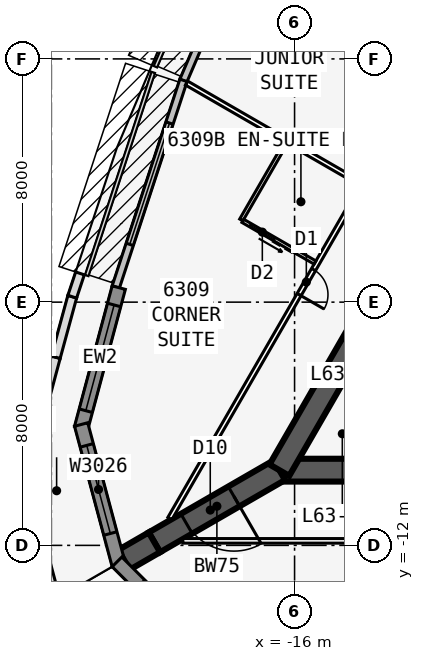
"""IFC4 building model, lengths in metres.
Left out: names, types, materials, properties, quantities, classifications, styles, units other than length and angle.
Written with IfcOpenShell. Run it as: python <this file> out.ifc"""

import sys

from ifc_helpers import new_model, si_unit, direction, frame, frame_2d, origin, place, context, subcontext, project, spatial, polyline, rectangle, outline, extrude, element, fill, save


model = new_model("IFC4")
c1 = context("Model", 3, precision=1e-05, world=origin(), true_north=direction((0.0, 1.0)))
c2 = subcontext(c1, "Body", "Model", "MODEL_VIEW")
j1 = project(units=[si_unit("LENGTHUNIT", "METRE"), si_unit("PLANEANGLEUNIT", "RADIAN")], contexts=[c1])
p1 = place(None, origin())
s1 = spatial("IfcSite", under=j1, at=p1, CompositionType="ELEMENT")
p2 = place(p1, origin())
s2 = spatial("IfcBuilding", under=s1, at=p2, CompositionType="ELEMENT")
p3 = place(p2, frame((0.0, 0.0, 239.3)))
s3 = spatial("IfcBuildingStorey", under=s2, at=p3, CompositionType="ELEMENT", Elevation=239.3)
p4 = place(p3, frame((-16.5, -9.526, 0.0), z_axis=(0.0, 0.0, 1.0), x_axis=(1.0, 0.0, 0.0)))
e1 = element("IfcWall", 1, at=p4, inside=s3, PredefinedType="SHEAR", context=c2, shape_type="SweptSolid", body=[
    extrude(rectangle(XDim=33.0, YDim=0.75, at=frame_2d((16.5, 0.0))), origin(), (0.0, 0.0, 1.0), 3.6),
])
p5 = place(p4, frame((14.05, 0.0, 0.0)))
e2 = element("IfcOpeningElement", 2, at=p5, cuts=e1, PredefinedType="OPENING", context=c2, shape_type="SweptSolid", body=[
    extrude(rectangle(XDim=1.8, YDim=2.13, at=frame_2d((0.9, 1.065))), frame((0.0, 0.385, 0.0), z_axis=(0.0, -1.0, 0.0), x_axis=(1.0, 0.0, 0.0)), (0.0, 0.0, 1.0), 0.77),
])
p6 = place(p3, frame((0.0, 19.052, 0.0), z_axis=(0.0, 0.0, 1.0), x_axis=(-0.499999749417, -0.866025548458, 0.0)))
e3 = element("IfcWall", 3, at=p6, inside=s3, PredefinedType="SHEAR", context=c2, shape_type="SweptSolid", body=[
    extrude(rectangle(XDim=33.0, YDim=0.75, at=frame_2d((16.5, 0.0))), origin(), (0.0, 0.0, 1.0), 3.6),
])
p7 = place(p6, frame((14.15, 0.0, 0.0)))
e4 = element("IfcOpeningElement", 4, at=p7, cuts=e3, PredefinedType="OPENING", context=c2, shape_type="SweptSolid", body=[
    extrude(rectangle(XDim=1.8, YDim=2.13, at=frame_2d((0.9, 1.065))), frame((0.0, 0.385, 0.0), z_axis=(0.0, -1.0, 0.0), x_axis=(1.0, 0.0, 0.0)), (0.0, 0.0, 1.0), 0.77),
])
p8 = place(p6, frame((12.6, 0.0, 0.0)))
e5 = element("IfcOpeningElement", 5, at=p8, cuts=e3, PredefinedType="OPENING", context=c2, shape_type="SweptSolid", body=[
    extrude(rectangle(XDim=1.0, YDim=2.13, at=frame_2d((0.5, 1.065))), frame((0.0, 0.385, 0.0), z_axis=(0.0, -1.0, 0.0), x_axis=(1.0, 0.0, 0.0)), (0.0, 0.0, 1.0), 0.77),
])
p9 = place(p3, frame((-16.5, -9.526, 0.0), z_axis=(0.0, 0.0, 1.0), x_axis=(-0.866031398331, -0.499989616998, 0.0)))
e6 = element("IfcWall", 6, at=p9, inside=s3, PredefinedType="SHEAR", context=c2, shape_type="SweptSolid", body=[
    extrude(rectangle(XDim=4.746, YDim=0.75, at=frame_2d((2.373, 0.0))), origin(), (0.0, 0.0, 1.0), 3.6),
])
p10 = place(p9, frame((1.725, 0.0, 0.0)))
e7 = element("IfcOpeningElement", 7, at=p10, cuts=e6, PredefinedType="OPENING", context=c2, shape_type="SweptSolid", body=[
    extrude(rectangle(XDim=1.8, YDim=2.13, at=frame_2d((0.9, 1.065))), frame((0.0, 0.385, 0.0), z_axis=(0.0, -1.0, 0.0), x_axis=(1.0, 0.0, 0.0)), (0.0, 0.0, 1.0), 0.77),
])
p11 = place(p3, frame((-20.61, -11.899, 0.0), z_axis=(0.0, 0.0, 1.0), x_axis=(-0.866009537788, -0.500027479704, 0.0)))
e8 = element("IfcWall", 8, at=p11, inside=s3, PredefinedType="SHEAR", context=c2, shape_type="SweptSolid", body=[
    extrude(rectangle(XDim=1.155, YDim=0.75, at=frame_2d((0.577, 0.0))), origin(), (0.0, 0.0, 1.0), 3.6),
])
p12 = place(p3, frame((-18.866, 5.136, 0.0), z_axis=(0.0, 0.0, 1.0), x_axis=(-0.393290226175, -0.91941437774, 0.0)))
e9 = element("IfcWall", 9, at=p12, inside=s3, PredefinedType="STANDARD", context=c2, shape_type="SweptSolid", body=[
    extrude(rectangle(XDim=2.014, YDim=0.25, at=frame_2d((1.007, 0.0))), origin(), (0.0, 0.0, 1.0), 3.435),
])
p13 = place(p3, frame((-19.654, 3.294, 0.0), z_axis=(0.0, 0.0, 1.0), x_axis=(-0.311328857048, -0.95030223759, 0.0)))
e10 = element("IfcWall", 10, at=p13, inside=s3, PredefinedType="STANDARD", context=c2, shape_type="SweptSolid", body=[
    extrude(rectangle(XDim=7.153, YDim=0.25, at=frame_2d((3.576, 0.0))), origin(), (0.0, 0.0, 1.0), 3.435),
])
p14 = place(p13, frame((1.476, 0.0, 0.45)))
e11 = element("IfcOpeningElement", 11, at=p14, cuts=e10, PredefinedType="OPENING", context=c2, shape_type="SweptSolid", body=[
    extrude(rectangle(XDim=4.2, YDim=2.6, at=frame_2d((2.1, 1.3))), frame((0.0, 0.135, 0.0), z_axis=(0.0, -1.0, 0.0), x_axis=(1.0, 0.0, 0.0)), (0.0, 0.0, 1.0), 0.27),
])
p15 = place(p3, frame((-21.783, -3.522, 0.0), z_axis=(0.0, 0.0, 1.0), x_axis=(-0.25880328844, -0.965930048136, 0.0)))
e12 = element("IfcWall", 12, at=p15, inside=s3, PredefinedType="SOLIDWALL", context=c2, shape_type="SweptSolid", body=[
    extrude(rectangle(XDim=4.782, YDim=0.45, at=frame_2d((2.391, 0.0))), origin(), (0.0, 0.0, 1.0), 3.435),
])
p16 = place(p15, frame((0.591, 0.0, 0.45)))
e13 = element("IfcOpeningElement", 13, at=p16, cuts=e12, PredefinedType="OPENING", context=c2, shape_type="SweptSolid", body=[
    extrude(rectangle(XDim=3.6, YDim=2.6, at=frame_2d((1.8, 1.3))), frame((0.0, 0.235, 0.0), z_axis=(0.0, -1.0, 0.0), x_axis=(1.0, 0.0, 0.0)), (0.0, 0.0, 1.0), 0.47),
])
p17 = place(p3, frame((-23.02, -8.025, 0.0), z_axis=(0.0, 0.0, 1.0), x_axis=(0.25880328844, -0.965930048136, 0.0)))
e14 = element("IfcWall", 14, at=p17, inside=s3, PredefinedType="SOLIDWALL", context=c2, shape_type="SweptSolid", body=[
    extrude(outline(polyline([(4.782, 0.225), (4.722, 0.225), (4.303, 0.113), (4.273, 0.225), (0.0, 0.225), (0.0, -0.225), (4.782, -0.225), (4.782, 0.225)])), origin(), (0.0, 0.0, 1.0), 3.435),
])
p18 = place(p17, frame((0.711, 0.0, 0.45)))
e15 = element("IfcOpeningElement", 15, at=p18, cuts=e14, PredefinedType="OPENING", context=c2, shape_type="SweptSolid", body=[
    extrude(rectangle(XDim=3.0, YDim=2.6, at=frame_2d((1.5, 1.3))), frame((0.0, 0.235, 0.0), z_axis=(0.0, -1.0, 0.0), x_axis=(1.0, 0.0, 0.0)), (0.0, 0.0, 1.0), 0.47),
])
p19 = place(p3, frame((-21.841, -12.542, 0.0), z_axis=(0.0, 0.0, 1.0), x_axis=(0.707081252484, -0.707132308968, 0.0)))
e16 = element("IfcWall", 16, at=p19, inside=s3, PredefinedType="SOLIDWALL", context=c2, shape_type="SweptSolid", body=[
    extrude(outline(polyline([(4.782, 0.225), (0.509, 0.225), (0.479, 0.113), (0.059, 0.225), (0.0, 0.225), (0.0, -0.225), (4.782, -0.225), (4.782, 0.225)])), origin(), (0.0, 0.0, 1.0), 3.435),
])
p20 = place(p19, frame((1.07, 0.0, 0.45)))
e17 = element("IfcOpeningElement", 17, at=p20, cuts=e16, PredefinedType="OPENING", context=c2, shape_type="SweptSolid", body=[
    extrude(rectangle(XDim=3.0, YDim=2.6, at=frame_2d((1.5, 1.3))), frame((0.0, 0.235, 0.0), z_axis=(0.0, -1.0, 0.0), x_axis=(1.0, 0.0, 0.0)), (0.0, 0.0, 1.0), 0.47),
])
p21 = place(p3, frame((-23.865, -13.779, 0.0), z_axis=(0.0, 0.0, 1.0), x_axis=(-0.258795560265, 0.965932118726, 0.0)))
e18 = element("IfcWall", 18, at=p21, inside=s3, PredefinedType="PARAPET", context=c2, shape_type="SweptSolid", body=[
    extrude(rectangle(XDim=4.104, YDim=0.3, at=frame_2d((2.052, 0.0))), origin(), (0.0, 0.0, 1.0), 1.1),
])
p22 = place(p3, frame((-24.927, -9.815, 0.0), z_axis=(0.0, 0.0, 1.0), x_axis=(0.258777316825, 0.965937006381, 0.0)))
e19 = element("IfcWall", 19, at=p22, inside=s3, PredefinedType="PARAPET", context=c2, shape_type="SweptSolid", body=[
    extrude(rectangle(XDim=4.144, YDim=0.3, at=frame_2d((2.072, 0.0))), origin(), (0.0, 0.0, 1.0), 1.1),
])
p23 = place(p3, frame((-23.855, -5.812, 0.0), z_axis=(0.0, 0.0, 1.0), x_axis=(0.262857141623, 0.964834764661, 0.0)))
e20 = element("IfcWall", 20, at=p23, inside=s3, PredefinedType="PARAPET", context=c2, shape_type="SweptSolid", body=[
    extrude(rectangle(XDim=2.064, YDim=0.3, at=frame_2d((1.032, 0.0))), origin(), (0.0, 0.0, 1.0), 1.1),
])
p24 = place(p3, frame((-23.313, -3.821, 0.0), z_axis=(0.0, 0.0, 1.0), x_axis=(0.315049484827, 0.949075245758, 0.0)))
e21 = element("IfcWall", 21, at=p24, inside=s3, PredefinedType="PARAPET", context=c2, shape_type="SweptSolid", body=[
    extrude(rectangle(XDim=0.808, YDim=0.3, at=frame_2d((0.404, 0.0))), origin(), (0.0, 0.0, 1.0), 1.1),
])
p25 = place(p3, frame((-19.677, -11.851, 0.0), z_axis=(0.0, 0.0, 1.0), x_axis=(1.0, 0.0, 0.0)))
e22 = element("IfcWall", 22, at=p25, inside=s3, PredefinedType="PARTITIONING", context=c2, shape_type="SweptSolid", body=[
    extrude(rectangle(XDim=39.354, YDim=0.15, at=frame_2d((19.677, 0.0))), origin(), (0.0, 0.0, 1.0), 3.435),
])
p26 = place(p25, frame((8.502, 0.0, 0.0)))
e23 = element("IfcOpeningElement", 23, at=p26, cuts=e22, PredefinedType="OPENING", context=c2, shape_type="SweptSolid", body=[
    extrude(rectangle(XDim=0.95, YDim=2.13, at=frame_2d((0.475, 1.065))), frame((0.0, 0.085, 0.0), z_axis=(0.0, -1.0, 0.0), x_axis=(1.0, 0.0, 0.0)), (0.0, 0.0, 1.0), 0.17),
])
p27 = place(p25, frame((15.677, 0.0, 0.0)))
e24 = element("IfcOpeningElement", 24, at=p27, cuts=e22, PredefinedType="OPENING", context=c2, shape_type="SweptSolid", body=[
    extrude(rectangle(XDim=1.0, YDim=2.13, at=frame_2d((0.5, 1.065))), frame((0.0, 0.085, 0.0), z_axis=(0.0, -1.0, 0.0), x_axis=(1.0, 0.0, 0.0)), (0.0, 0.0, 1.0), 0.17),
])
p28 = place(p25, frame((22.902, 0.0, 0.0)))
e25 = element("IfcOpeningElement", 25, at=p28, cuts=e22, PredefinedType="OPENING", context=c2, shape_type="SweptSolid", body=[
    extrude(rectangle(XDim=0.95, YDim=2.13, at=frame_2d((0.475, 1.065))), frame((0.0, 0.085, 0.0), z_axis=(0.0, -1.0, 0.0), x_axis=(1.0, 0.0, 0.0)), (0.0, 0.0, 1.0), 0.17),
])
p29 = place(p25, frame((29.902, 0.0, 0.0)))
e26 = element("IfcOpeningElement", 26, at=p29, cuts=e22, PredefinedType="OPENING", context=c2, shape_type="SweptSolid", body=[
    extrude(rectangle(XDim=0.95, YDim=2.13, at=frame_2d((0.475, 1.065))), frame((0.0, 0.085, 0.0), z_axis=(0.0, -1.0, 0.0), x_axis=(1.0, 0.0, 0.0)), (0.0, 0.0, 1.0), 0.17),
])
p30 = place(p3, frame((-0.425, 22.966, 0.0), z_axis=(0.0, 0.0, 1.0), x_axis=(-0.500000265775, -0.866025250339, 0.0)))
e27 = element("IfcWall", 27, at=p30, inside=s3, PredefinedType="PARTITIONING", context=c2, shape_type="SweptSolid", body=[
    extrude(rectangle(XDim=39.354, YDim=0.15, at=frame_2d((19.677, 0.0))), origin(), (0.0, 0.0, 1.0), 3.435),
])
p31 = place(p30, frame((8.502, 0.0, 0.0)))
e28 = element("IfcOpeningElement", 28, at=p31, cuts=e27, PredefinedType="OPENING", context=c2, shape_type="SweptSolid", body=[
    extrude(rectangle(XDim=0.95, YDim=2.13, at=frame_2d((0.475, 1.065))), frame((0.0, 0.085, 0.0), z_axis=(0.0, -1.0, 0.0), x_axis=(1.0, 0.0, 0.0)), (0.0, 0.0, 1.0), 0.17),
])
p32 = place(p30, frame((15.902, 0.0, 0.0)))
e29 = element("IfcOpeningElement", 29, at=p32, cuts=e27, PredefinedType="OPENING", context=c2, shape_type="SweptSolid", body=[
    extrude(rectangle(XDim=0.95, YDim=2.13, at=frame_2d((0.475, 1.065))), frame((0.0, 0.085, 0.0), z_axis=(0.0, -1.0, 0.0), x_axis=(1.0, 0.0, 0.0)), (0.0, 0.0, 1.0), 0.17),
])
p33 = place(p30, frame((22.902, 0.0, 0.0)))
e30 = element("IfcOpeningElement", 30, at=p33, cuts=e27, PredefinedType="OPENING", context=c2, shape_type="SweptSolid", body=[
    extrude(rectangle(XDim=0.95, YDim=2.13, at=frame_2d((0.475, 1.065))), frame((0.0, 0.085, 0.0), z_axis=(0.0, -1.0, 0.0), x_axis=(1.0, 0.0, 0.0)), (0.0, 0.0, 1.0), 0.17),
])
p34 = place(p30, frame((29.902, 0.0, 0.0)))
e31 = element("IfcOpeningElement", 31, at=p34, cuts=e27, PredefinedType="OPENING", context=c2, shape_type="SweptSolid", body=[
    extrude(rectangle(XDim=0.95, YDim=2.13, at=frame_2d((0.475, 1.065))), frame((0.0, 0.085, 0.0), z_axis=(0.0, -1.0, 0.0), x_axis=(1.0, 0.0, 0.0)), (0.0, 0.0, 1.0), 0.17),
])
p35 = place(p3, frame((-13.829, -0.099, 0.0), z_axis=(0.0, 0.0, 1.0), x_axis=(-0.866022562216, 0.500004921708, 0.0)))
e32 = element("IfcWall", 32, at=p35, inside=s3, PredefinedType="PARTITIONING", context=c2, shape_type="SweptSolid", body=[
    extrude(rectangle(XDim=6.609, YDim=0.15, at=frame_2d((3.304, 0.0))), origin(), (0.0, 0.0, 1.0), 2.678),
])
p36 = place(p3, frame((-16.253, 1.301, 0.0), z_axis=(0.0, 0.0, 1.0), x_axis=(-0.499990139034, -0.866031096941, 0.0)))
e33 = element("IfcWall", 33, at=p36, inside=s3, PredefinedType="PLUMBINGWALL", context=c2, shape_type="SweptSolid", body=[
    extrude(rectangle(XDim=3.0, YDim=0.12, at=frame_2d((1.5, 0.0))), origin(), (0.0, 0.0, 1.0), 3.435),
])
p37 = place(p3, frame((-15.329, -2.697, 0.0), z_axis=(0.0, 0.0, 1.0), x_axis=(-0.866035715982, 0.499982138324, 0.0)))
e34 = element("IfcWall", 34, at=p37, inside=s3, PredefinedType="PLUMBINGWALL", context=c2, shape_type="SweptSolid", body=[
    extrude(rectangle(XDim=2.74, YDim=0.12, at=frame_2d((1.37, 0.0))), origin(), (0.0, 0.0, 1.0), 3.435),
])
p38 = place(p37, frame((1.55, 0.0, 0.0)))
e35 = element("IfcOpeningElement", 35, at=p38, cuts=e34, PredefinedType="OPENING", context=c2, shape_type="SweptSolid", body=[
    extrude(rectangle(XDim=0.9, YDim=2.13, at=frame_2d((0.45, 1.065))), frame((0.0, 0.07, 0.0), z_axis=(0.0, -1.0, 0.0), x_axis=(1.0, 0.0, 0.0)), (0.0, 0.0, 1.0), 0.14),
])
p39 = place(p3, frame((-12.848, -9.151, 0.0), z_axis=(0.0, 0.0, 1.0), x_axis=(-0.499952404951, 0.866052881055, 0.0)))
e36 = element("IfcWall", 36, at=p39, inside=s3, PredefinedType="SOLIDWALL", context=c2, shape_type="SweptSolid", body=[
    extrude(rectangle(XDim=3.002, YDim=0.2, at=frame_2d((1.501, 0.0))), origin(), (0.0, 0.0, 1.0), 3.435),
])
p40 = place(p14, origin())
e37 = element("IfcWindow", 37, at=p40, inside=s3, PartitioningType="SINGLE_PANEL", PredefinedType="WINDOW", context=c2, shape_type="SweptSolid", body=[
    extrude(rectangle(XDim=4.2, YDim=2.6, at=frame_2d((2.1, 1.3))), frame((0.0, 0.03, 0.0), z_axis=(0.0, -1.0, 0.0), x_axis=(1.0, 0.0, 0.0)), (0.0, 0.0, 1.0), 0.06),
])
fill(e11, e37)
p41 = place(p16, origin())
e38 = element("IfcWindow", 38, at=p41, inside=s3, PartitioningType="SINGLE_PANEL", PredefinedType="WINDOW", context=c2, shape_type="SweptSolid", body=[
    extrude(rectangle(XDim=3.6, YDim=2.6, at=frame_2d((1.8, 1.3))), frame((0.0, 0.03, 0.0), z_axis=(0.0, -1.0, 0.0), x_axis=(1.0, 0.0, 0.0)), (0.0, 0.0, 1.0), 0.06),
])
fill(e13, e38)
p42 = place(p18, origin())
e39 = element("IfcWindow", 39, at=p42, inside=s3, PartitioningType="SINGLE_PANEL", PredefinedType="WINDOW", context=c2, shape_type="SweptSolid", body=[
    extrude(rectangle(XDim=3.0, YDim=2.6, at=frame_2d((1.5, 1.3))), frame((0.0, 0.03, 0.0), z_axis=(0.0, -1.0, 0.0), x_axis=(1.0, 0.0, 0.0)), (0.0, 0.0, 1.0), 0.06),
])
fill(e15, e39)
p43 = place(p38, origin())
e40 = element("IfcDoor", 40, at=p43, inside=s3, OperationType="SLIDING_TO_LEFT", PredefinedType="DOOR", context=c2, shape_type="SweptSolid", body=[
    extrude(rectangle(XDim=0.9, YDim=2.13, at=frame_2d((0.45, 1.065))), frame((0.0, 0.025, 0.0), z_axis=(0.0, -1.0, 0.0), x_axis=(1.0, 0.0, 0.0)), (0.0, 0.0, 1.0), 0.05),
])
fill(e35, e40)
p44 = place(p34, origin())
e41 = element("IfcDoor", 41, at=p44, inside=s3, OperationType="SINGLE_SWING_RIGHT", PredefinedType="DOOR", context=c2, shape_type="SweptSolid", body=[
    extrude(rectangle(XDim=0.95, YDim=2.13, at=frame_2d((0.475, 1.065))), frame((0.0, 0.025, 0.0), z_axis=(0.0, -1.0, 0.0), x_axis=(1.0, 0.0, 0.0)), (0.0, 0.0, 1.0), 0.05),
])
fill(e31, e41)
p45 = place(p10, origin())
e42 = element("IfcDoor", 42, at=p45, inside=s3, OperationType="DOUBLE_DOOR_DOUBLE_SWING", PredefinedType="DOOR", context=c2, shape_type="SweptSolid", body=[
    extrude(rectangle(XDim=1.8, YDim=2.13, at=frame_2d((0.9, 1.065))), frame((0.0, 0.025, 0.0), z_axis=(0.0, -1.0, 0.0), x_axis=(1.0, 0.0, 0.0)), (0.0, 0.0, 1.0), 0.05),
])
fill(e7, e42)
save(model, sys.argv[1])
